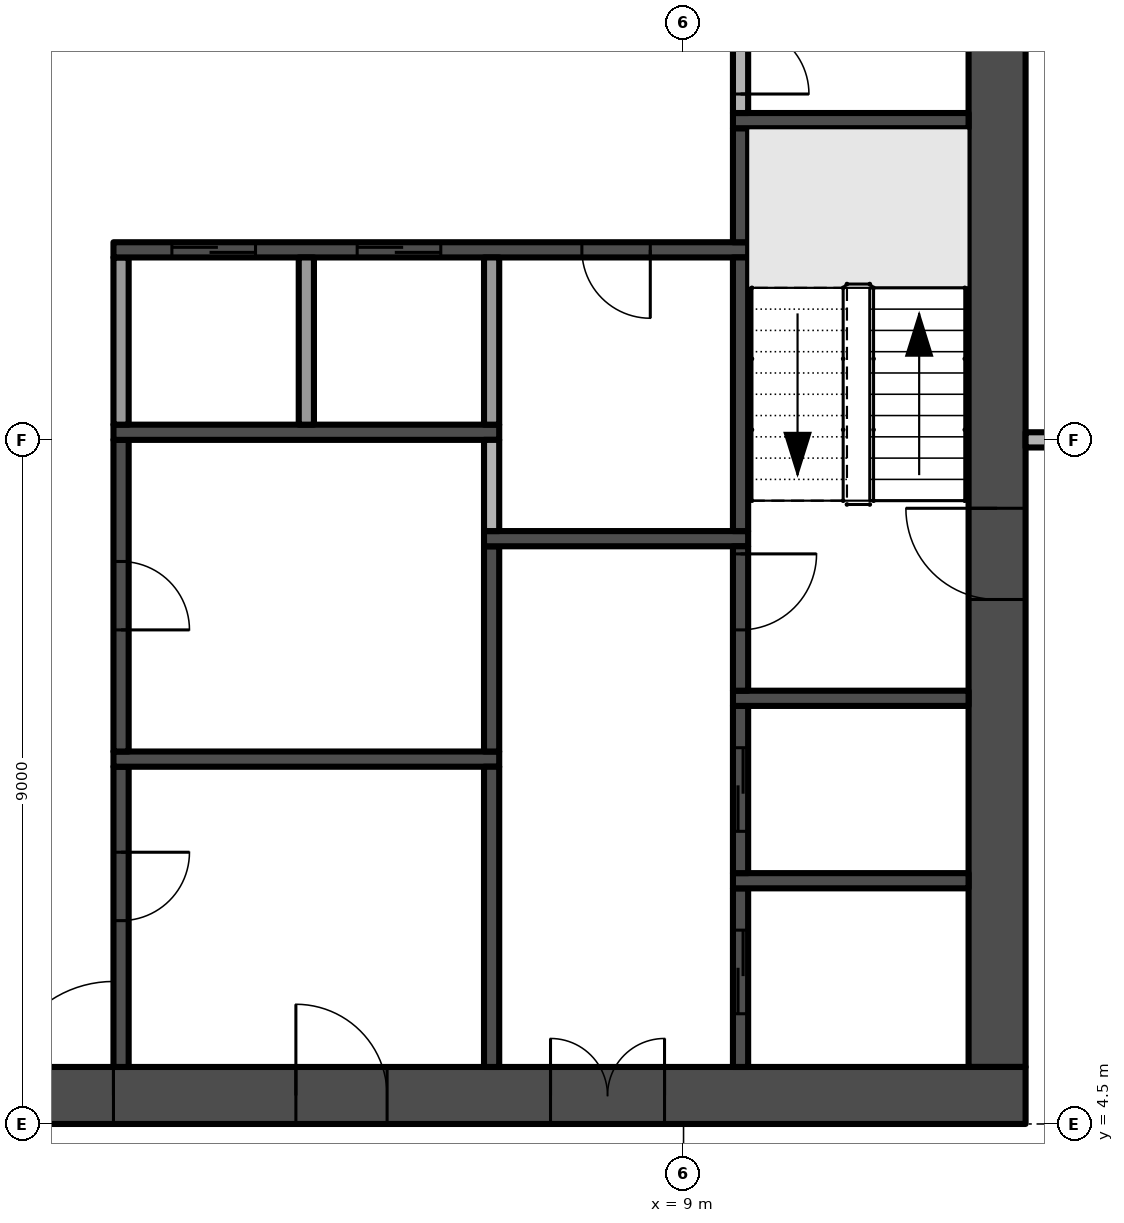
"""IFC4 building model, lengths in metres.
Left out: names, types, materials, properties, quantities, classifications, styles, units other than length and angle.
Written with IfcOpenShell. Run it as: python <this file> out.ifc"""

import sys

from ifc_helpers import new_model, si_unit, direction, frame, frame_2d, origin, place, context, subcontext, project, spatial, rectangle, extrude, element, fill, save


model = new_model("IFC4")
c1 = context("Model", 3, precision=1e-05, world=origin(), true_north=direction((0.0, 1.0)))
c2 = subcontext(c1, "Body", "Model", "MODEL_VIEW")
j1 = project(units=[si_unit("LENGTHUNIT", "METRE"), si_unit("PLANEANGLEUNIT", "RADIAN")], contexts=[c1])
p1 = place(None, origin())
s1 = spatial("IfcSite", under=j1, at=p1, CompositionType="ELEMENT")
p2 = place(p1, origin())
s2 = spatial("IfcBuilding", under=s1, at=p2, CompositionType="ELEMENT")
p3 = place(p2, frame((0.0, 0.0, 128.8)))
s3 = spatial("IfcBuildingStorey", under=s2, at=p3, CompositionType="ELEMENT", Elevation=128.8)
p4 = place(p3, frame((-13.5, 4.875, -0.3), z_axis=(0.0, 0.0, 1.0), x_axis=(1.0, 0.0, 0.0)))
e1 = element("IfcWall", 1, at=p4, inside=s3, PredefinedType="SHEAR", context=c2, shape_type="SweptSolid", body=[
    extrude(rectangle(XDim=27.0, YDim=0.75, at=frame_2d((13.5, 0.0))), origin(), (0.0, 0.0, 1.0), 3.8),
])
p5 = place(p4, frame((12.0, 0.0, 0.3)))
e2 = element("IfcOpeningElement", 2, at=p5, cuts=e1, PredefinedType="OPENING", context=c2, shape_type="SweptSolid", body=[
    extrude(rectangle(XDim=3.0, YDim=2.4, at=frame_2d((1.5, 1.2))), frame((0.0, 0.385, 0.0), z_axis=(0.0, -1.0, 0.0), x_axis=(1.0, 0.0, 0.0)), (0.0, 0.0, 1.0), 0.77),
])
p6 = place(p4, frame((4.9, 0.0, 0.3)))
e3 = element("IfcOpeningElement", 3, at=p6, cuts=e1, PredefinedType="OPENING", context=c2, shape_type="SweptSolid", body=[
    extrude(rectangle(XDim=1.2, YDim=2.2, at=frame_2d((0.6, 1.1))), frame((0.0, 0.385, 0.0), z_axis=(0.0, -1.0, 0.0), x_axis=(1.0, 0.0, 0.0)), (0.0, 0.0, 1.0), 0.77),
])
p7 = place(p4, frame((20.75, 0.0, 0.3)))
e4 = element("IfcOpeningElement", 4, at=p7, cuts=e1, PredefinedType="OPENING", context=c2, shape_type="SweptSolid", body=[
    extrude(rectangle(XDim=1.5, YDim=2.2, at=frame_2d((0.75, 1.1))), frame((0.0, 0.385, 0.0), z_axis=(0.0, -1.0, 0.0), x_axis=(1.0, 0.0, 0.0)), (0.0, 0.0, 1.0), 0.77),
])
p8 = place(p4, frame((17.4, 0.0, 0.3)))
e5 = element("IfcOpeningElement", 5, at=p8, cuts=e1, PredefinedType="OPENING", context=c2, shape_type="SweptSolid", body=[
    extrude(rectangle(XDim=1.2, YDim=2.2, at=frame_2d((0.6, 1.1))), frame((0.0, 0.385, 0.0), z_axis=(0.0, -1.0, 0.0), x_axis=(1.0, 0.0, 0.0)), (0.0, 0.0, 1.0), 0.77),
])
p9 = place(p3, frame((13.125, 5.25, -0.3), z_axis=(0.0, 0.0, 1.0), x_axis=(0.0, 1.0, 0.0)))
e6 = element("IfcWall", 6, at=p9, inside=s3, PredefinedType="SHEAR", context=c2, shape_type="SweptSolid", body=[
    extrude(rectangle(XDim=16.5, YDim=0.75, at=frame_2d((8.25, 0.0))), origin(), (0.0, 0.0, 1.0), 3.8),
])
p10 = place(p9, frame((6.15, 0.0, 0.3)))
e7 = element("IfcOpeningElement", 7, at=p10, cuts=e6, PredefinedType="OPENING", context=c2, shape_type="SweptSolid", body=[
    extrude(rectangle(XDim=1.2, YDim=2.2, at=frame_2d((0.6, 1.1))), frame((0.0, 0.385, 0.0), z_axis=(0.0, -1.0, 0.0), x_axis=(1.0, 0.0, 0.0)), (0.0, 0.0, 1.0), 0.77),
])
p11 = place(p3, frame((1.6, 9.2, 0.0), z_axis=(0.0, 0.0, 1.0), x_axis=(0.0, -1.0, 0.0)))
e8 = element("IfcWall", 8, at=p11, inside=s3, PredefinedType="SHEAR", context=c2, shape_type="SweptSolid", body=[
    extrude(rectangle(XDim=3.95, YDim=0.2, at=frame_2d((1.975, 0.0))), origin(), (0.0, 0.0, 1.0), 3.5),
])
p12 = place(p11, frame((1.125, 0.0, 0.0)))
e9 = element("IfcOpeningElement", 9, at=p12, cuts=e8, PredefinedType="OPENING", context=c2, shape_type="SweptSolid", body=[
    extrude(rectangle(XDim=0.9, YDim=2.1, at=frame_2d((0.45, 1.05))), frame((0.0, 0.11, 0.0), z_axis=(0.0, -1.0, 0.0), x_axis=(1.0, 0.0, 0.0)), (0.0, 0.0, 1.0), 0.22),
])
p13 = place(p3, frame((1.5, 9.3, 0.0), z_axis=(0.0, 0.0, 1.0), x_axis=(1.0, 0.0, 0.0)))
e10 = element("IfcWall", 10, at=p13, inside=s3, PredefinedType="SHEAR", context=c2, shape_type="SweptSolid", body=[
    extrude(rectangle(XDim=5.075, YDim=0.2, at=frame_2d((2.538, 0.0))), origin(), (0.0, 0.0, 1.0), 3.5),
])
p14 = place(p3, frame((1.6, 13.5, 0.0), z_axis=(0.0, 0.0, 1.0), x_axis=(0.0, -1.0, 0.0)))
e11 = element("IfcWall", 11, at=p14, inside=s3, PredefinedType="SHEAR", context=c2, shape_type="SweptSolid", body=[
    extrude(rectangle(XDim=4.1, YDim=0.2, at=frame_2d((2.05, 0.0))), origin(), (0.0, 0.0, 1.0), 3.5),
])
p15 = place(p14, frame((1.6, 0.0, 0.0)))
e12 = element("IfcOpeningElement", 12, at=p15, cuts=e11, PredefinedType="OPENING", context=c2, shape_type="SweptSolid", body=[
    extrude(rectangle(XDim=0.9, YDim=2.1, at=frame_2d((0.45, 1.05))), frame((0.0, 0.11, 0.0), z_axis=(0.0, -1.0, 0.0), x_axis=(1.0, 0.0, 0.0)), (0.0, 0.0, 1.0), 0.22),
])
p16 = place(p3, frame((1.5, 13.6, 0.0), z_axis=(0.0, 0.0, 1.0), x_axis=(1.0, 0.0, 0.0)))
e13 = element("IfcWall", 13, at=p16, inside=s3, PredefinedType="SHEAR", context=c2, shape_type="SweptSolid", body=[
    extrude(rectangle(XDim=5.075, YDim=0.2, at=frame_2d((2.538, 0.0))), origin(), (0.0, 0.0, 1.0), 3.5),
])
p17 = place(p3, frame((1.6, 13.7, 0.0), z_axis=(0.0, 0.0, 1.0), x_axis=(0.0, 1.0, 0.0)))
e14 = element("IfcWall", 14, at=p17, inside=s3, PredefinedType="PARTITIONING", context=c2, shape_type="SweptSolid", body=[
    extrude(rectangle(XDim=2.2, YDim=0.2, at=frame_2d((1.1, 0.0))), origin(), (0.0, 0.0, 1.0), 3.5),
])
p18 = place(p3, frame((9.85, 16.0, 0.0), z_axis=(0.0, 0.0, 1.0), x_axis=(-1.0, 0.0, 0.0)))
e15 = element("IfcWall", 15, at=p18, inside=s3, PredefinedType="SHEAR", context=c2, shape_type="SweptSolid", body=[
    extrude(rectangle(XDim=8.35, YDim=0.2, at=frame_2d((4.175, 0.0))), origin(), (0.0, 0.0, 1.0), 3.5),
])
p19 = place(p18, frame((6.481, 0.0, 0.0)))
e16 = element("IfcOpeningElement", 16, at=p19, cuts=e15, PredefinedType="OPENING", context=c2, shape_type="SweptSolid", body=[
    extrude(rectangle(XDim=1.1, YDim=2.1, at=frame_2d((0.55, 1.05))), frame((0.0, 0.11, 0.0), z_axis=(0.0, -1.0, 0.0), x_axis=(1.0, 0.0, 0.0)), (0.0, 0.0, 1.0), 0.22),
])
p20 = place(p18, frame((4.044, 0.0, 0.0)))
e17 = element("IfcOpeningElement", 17, at=p20, cuts=e15, PredefinedType="OPENING", context=c2, shape_type="SweptSolid", body=[
    extrude(rectangle(XDim=1.1, YDim=2.1, at=frame_2d((0.55, 1.05))), frame((0.0, 0.11, 0.0), z_axis=(0.0, -1.0, 0.0), x_axis=(1.0, 0.0, 0.0)), (0.0, 0.0, 1.0), 0.22),
])
p21 = place(p18, frame((1.288, 0.0, 0.0)))
e18 = element("IfcOpeningElement", 18, at=p21, cuts=e15, PredefinedType="OPENING", context=c2, shape_type="SweptSolid", body=[
    extrude(rectangle(XDim=0.9, YDim=2.1, at=frame_2d((0.45, 1.05))), frame((0.0, 0.11, 0.0), z_axis=(0.0, -1.0, 0.0), x_axis=(1.0, 0.0, 0.0)), (0.0, 0.0, 1.0), 0.22),
])
p22 = place(p3, frame((4.037, 13.7, 0.0), z_axis=(0.0, 0.0, 1.0), x_axis=(0.0, 1.0, 0.0)))
e19 = element("IfcWall", 19, at=p22, inside=s3, PredefinedType="PARTITIONING", context=c2, shape_type="SweptSolid", body=[
    extrude(rectangle(XDim=2.2, YDim=0.2, at=frame_2d((1.1, 0.0))), origin(), (0.0, 0.0, 1.0), 3.5),
])
p23 = place(p3, frame((6.475, 5.25, 0.0), z_axis=(0.0, 0.0, 1.0), x_axis=(0.0, 1.0, 0.0)))
e20 = element("IfcWall", 20, at=p23, inside=s3, PredefinedType="SHEAR", context=c2, shape_type="SweptSolid", body=[
    extrude(rectangle(XDim=3.95, YDim=0.2, at=frame_2d((1.975, 0.0))), origin(), (0.0, 0.0, 1.0), 3.5),
])
p24 = place(p3, frame((6.475, 9.4, 0.0), z_axis=(0.0, 0.0, 1.0), x_axis=(0.0, 1.0, 0.0)))
e21 = element("IfcWall", 21, at=p24, inside=s3, PredefinedType="SHEAR", context=c2, shape_type="SweptSolid", body=[
    extrude(rectangle(XDim=2.7, YDim=0.2, at=frame_2d((1.35, 0.0))), origin(), (0.0, 0.0, 1.0), 3.5),
])
p25 = place(p3, frame((6.375, 12.2, 0.0), z_axis=(0.0, 0.0, 1.0), x_axis=(1.0, 0.0, 0.0)))
e22 = element("IfcWall", 22, at=p25, inside=s3, PredefinedType="SHEAR", context=c2, shape_type="SweptSolid", body=[
    extrude(rectangle(XDim=3.475, YDim=0.2, at=frame_2d((1.738, 0.0))), origin(), (0.0, 0.0, 1.0), 3.5),
])
p26 = place(p3, frame((6.475, 12.3, 0.0), z_axis=(0.0, 0.0, 1.0), x_axis=(0.0, 1.0, 0.0)))
e23 = element("IfcWall", 23, at=p26, inside=s3, PredefinedType="PARTITIONING", context=c2, shape_type="SweptSolid", body=[
    extrude(rectangle(XDim=1.2, YDim=0.2, at=frame_2d((0.6, 0.0))), origin(), (0.0, 0.0, 1.0), 3.5),
])
p27 = place(p3, frame((6.475, 13.7, 0.0), z_axis=(0.0, 0.0, 1.0), x_axis=(0.0, 1.0, 0.0)))
e24 = element("IfcWall", 24, at=p27, inside=s3, PredefinedType="PARTITIONING", context=c2, shape_type="SweptSolid", body=[
    extrude(rectangle(XDim=2.2, YDim=0.2, at=frame_2d((1.1, 0.0))), origin(), (0.0, 0.0, 1.0), 3.5),
])
p28 = place(p3, frame((9.75, 5.25, 0.0), z_axis=(0.0, 0.0, 1.0), x_axis=(0.0, 1.0, 0.0)))
e25 = element("IfcWall", 25, at=p28, inside=s3, PredefinedType="SHEAR", context=c2, shape_type="SweptSolid", body=[
    extrude(rectangle(XDim=2.35, YDim=0.2, at=frame_2d((1.175, 0.0))), origin(), (0.0, 0.0, 1.0), 3.5),
])
p29 = place(p28, frame((0.7, 0.0, 0.0)))
e26 = element("IfcOpeningElement", 26, at=p29, cuts=e25, PredefinedType="OPENING", context=c2, shape_type="SweptSolid", body=[
    extrude(rectangle(XDim=1.1, YDim=2.1, at=frame_2d((0.55, 1.05))), frame((0.0, 0.11, 0.0), z_axis=(0.0, -1.0, 0.0), x_axis=(1.0, 0.0, 0.0)), (0.0, 0.0, 1.0), 0.22),
])
p30 = place(p3, frame((9.65, 7.7, 0.0), z_axis=(0.0, 0.0, 1.0), x_axis=(1.0, 0.0, 0.0)))
e27 = element("IfcWall", 27, at=p30, inside=s3, PredefinedType="SHEAR", context=c2, shape_type="SweptSolid", body=[
    extrude(rectangle(XDim=3.1, YDim=0.2, at=frame_2d((1.55, 0.0))), origin(), (0.0, 0.0, 1.0), 3.5),
])
p31 = place(p3, frame((9.75, 7.8, 0.0), z_axis=(0.0, 0.0, 1.0), x_axis=(0.0, 1.0, 0.0)))
e28 = element("IfcWall", 28, at=p31, inside=s3, PredefinedType="SHEAR", context=c2, shape_type="SweptSolid", body=[
    extrude(rectangle(XDim=2.2, YDim=0.2, at=frame_2d((1.1, 0.0))), origin(), (0.0, 0.0, 1.0), 3.5),
])
p32 = place(p31, frame((0.55, 0.0, 0.0)))
e29 = element("IfcOpeningElement", 29, at=p32, cuts=e28, PredefinedType="OPENING", context=c2, shape_type="SweptSolid", body=[
    extrude(rectangle(XDim=1.1, YDim=2.1, at=frame_2d((0.55, 1.05))), frame((0.0, 0.11, 0.0), z_axis=(0.0, -1.0, 0.0), x_axis=(1.0, 0.0, 0.0)), (0.0, 0.0, 1.0), 0.22),
])
p33 = place(p3, frame((9.65, 10.1, 0.0), z_axis=(0.0, 0.0, 1.0), x_axis=(1.0, 0.0, 0.0)))
e30 = element("IfcWall", 30, at=p33, inside=s3, PredefinedType="SHEAR", context=c2, shape_type="SweptSolid", body=[
    extrude(rectangle(XDim=3.1, YDim=0.2, at=frame_2d((1.55, 0.0))), origin(), (0.0, 0.0, 1.0), 3.5),
])
p34 = place(p3, frame((9.75, 12.1, 0.0), z_axis=(0.0, 0.0, 1.0), x_axis=(0.0, -1.0, 0.0)))
e31 = element("IfcWall", 31, at=p34, inside=s3, PredefinedType="SHEAR", context=c2, shape_type="SweptSolid", body=[
    extrude(rectangle(XDim=1.9, YDim=0.2, at=frame_2d((0.95, 0.0))), origin(), (0.0, 0.0, 1.0), 3.5),
])
p35 = place(p34, frame((0.1, 0.0, 0.0)))
e32 = element("IfcOpeningElement", 32, at=p35, cuts=e31, PredefinedType="OPENING", context=c2, shape_type="SweptSolid", body=[
    extrude(rectangle(XDim=1.0, YDim=2.2, at=frame_2d((0.5, 1.1))), frame((0.0, 0.11, 0.0), z_axis=(0.0, -1.0, 0.0), x_axis=(1.0, 0.0, 0.0)), (0.0, 0.0, 1.0), 0.22),
])
p36 = place(p3, frame((9.75, 12.3, 0.0), z_axis=(0.0, 0.0, 1.0), x_axis=(0.0, 1.0, 0.0)))
e33 = element("IfcWall", 33, at=p36, inside=s3, PredefinedType="SHEAR", context=c2, shape_type="SweptSolid", body=[
    extrude(rectangle(XDim=3.6, YDim=0.2, at=frame_2d((1.8, 0.0))), origin(), (0.0, 0.0, 1.0), 3.5),
])
p37 = place(p3, frame((9.75, 16.1, 0.0), z_axis=(0.0, 0.0, 1.0), x_axis=(0.0, 1.0, 0.0)))
e34 = element("IfcWall", 34, at=p37, inside=s3, PredefinedType="SHEAR", context=c2, shape_type="SweptSolid", body=[
    extrude(rectangle(XDim=1.5, YDim=0.2, at=frame_2d((0.75, 0.0))), origin(), (0.0, 0.0, 1.0), 3.5),
])
p38 = place(p3, frame((9.65, 17.7, 0.0), z_axis=(0.0, 0.0, 1.0), x_axis=(1.0, 0.0, 0.0)))
e35 = element("IfcWall", 35, at=p38, inside=s3, PredefinedType="SHEAR", context=c2, shape_type="SweptSolid", body=[
    extrude(rectangle(XDim=3.1, YDim=0.2, at=frame_2d((1.55, 0.0))), origin(), (0.0, 0.0, 1.0), 3.5),
])
p39 = place(p3, frame((9.75, 19.2, 0.0), z_axis=(0.0, 0.0, 1.0), x_axis=(0.0, -1.0, 0.0)))
e36 = element("IfcWall", 36, at=p39, inside=s3, PredefinedType="PARTITIONING", context=c2, shape_type="SweptSolid", body=[
    extrude(rectangle(XDim=1.4, YDim=0.2, at=frame_2d((0.7, 0.0))), origin(), (0.0, 0.0, 1.0), 3.5),
])
p40 = place(p39, frame((0.25, 0.0, 0.0)))
e37 = element("IfcOpeningElement", 37, at=p40, cuts=e36, PredefinedType="OPENING", context=c2, shape_type="SweptSolid", body=[
    extrude(rectangle(XDim=0.9, YDim=2.1, at=frame_2d((0.45, 1.05))), frame((0.0, 0.11, 0.0), z_axis=(0.0, -1.0, 0.0), x_axis=(1.0, 0.0, 0.0)), (0.0, 0.0, 1.0), 0.22),
])
p41 = place(p3, frame((13.5, 13.5, 0.0), z_axis=(0.0, 0.0, 1.0), x_axis=(1.0, 0.0, 0.0)))
e38 = element("IfcWall", 38, at=p41, inside=s3, PredefinedType="PARTITIONING", context=c2, shape_type="SweptSolid", body=[
    extrude(rectangle(XDim=3.85, YDim=0.2, at=frame_2d((1.925, 0.0))), origin(), (0.0, 0.0, 1.0), 3.5),
])
p42 = place(p41, frame((1.6, 0.0, 0.0)))
e39 = element("IfcOpeningElement", 39, at=p42, cuts=e38, PredefinedType="OPENING", context=c2, shape_type="SweptSolid", body=[
    extrude(rectangle(XDim=0.9, YDim=2.1, at=frame_2d((0.45, 1.05))), frame((0.0, 0.11, 0.0), z_axis=(0.0, -1.0, 0.0), x_axis=(1.0, 0.0, 0.0)), (0.0, 0.0, 1.0), 0.22),
])
p43 = place(p5, frame((3.0, 0.0, 0.0), z_axis=(0.0, 0.0, 1.0), x_axis=(-1.0, 0.0, 0.0)))
e40 = element("IfcDoor", 40, at=p43, inside=s3, OperationType="DOUBLE_DOOR_SINGLE_SWING", PredefinedType="DOOR", context=c2, shape_type="SweptSolid", body=[
    extrude(rectangle(XDim=3.0, YDim=2.4, at=frame_2d((1.5, 1.2))), frame((0.0, 0.025, 0.0), z_axis=(0.0, -1.0, 0.0), x_axis=(1.0, 0.0, 0.0)), (0.0, 0.0, 1.0), 0.05),
])
fill(e2, e40)
p44 = place(p10, frame((1.2, 0.0, 0.0), z_axis=(0.0, 0.0, 1.0), x_axis=(-1.0, 0.0, 0.0)))
e41 = element("IfcDoor", 41, at=p44, inside=s3, OperationType="SINGLE_SWING_LEFT", PredefinedType="DOOR", context=c2, shape_type="SweptSolid", body=[
    extrude(rectangle(XDim=1.2, YDim=2.2, at=frame_2d((0.6, 1.1))), frame((0.0, 0.025, 0.0), z_axis=(0.0, -1.0, 0.0), x_axis=(1.0, 0.0, 0.0)), (0.0, 0.0, 1.0), 0.05),
])
fill(e7, e41)
p45 = place(p7, frame((1.5, 0.0, 0.0), z_axis=(0.0, 0.0, 1.0), x_axis=(-1.0, 0.0, 0.0)))
e42 = element("IfcDoor", 42, at=p45, inside=s3, OperationType="DOUBLE_DOOR_SINGLE_SWING", PredefinedType="DOOR", context=c2, shape_type="SweptSolid", body=[
    extrude(rectangle(XDim=1.5, YDim=2.2, at=frame_2d((0.75, 1.1))), frame((0.0, 0.025, 0.0), z_axis=(0.0, -1.0, 0.0), x_axis=(1.0, 0.0, 0.0)), (0.0, 0.0, 1.0), 0.05),
])
fill(e4, e42)
p46 = place(p8, frame((1.2, 0.0, 0.0), z_axis=(0.0, 0.0, 1.0), x_axis=(-1.0, 0.0, 0.0)))
e43 = element("IfcDoor", 43, at=p46, inside=s3, OperationType="SINGLE_SWING_RIGHT", PredefinedType="DOOR", context=c2, shape_type="SweptSolid", body=[
    extrude(rectangle(XDim=1.2, YDim=2.2, at=frame_2d((0.6, 1.1))), frame((0.0, 0.025, 0.0), z_axis=(0.0, -1.0, 0.0), x_axis=(1.0, 0.0, 0.0)), (0.0, 0.0, 1.0), 0.05),
])
fill(e5, e43)
p47 = place(p35, origin())
e44 = element("IfcDoor", 44, at=p47, inside=s3, OperationType="SINGLE_SWING_LEFT", PredefinedType="DOOR", context=c2, shape_type="SweptSolid", body=[
    extrude(rectangle(XDim=1.0, YDim=2.2, at=frame_2d((0.5, 1.1))), frame((0.0, 0.025, 0.0), z_axis=(0.0, -1.0, 0.0), x_axis=(1.0, 0.0, 0.0)), (0.0, 0.0, 1.0), 0.05),
])
fill(e32, e44)
p48 = place(p19, origin())
e45 = element("IfcDoor", 45, at=p48, inside=s3, OperationType="SLIDING_TO_RIGHT", PredefinedType="DOOR", context=c2, shape_type="SweptSolid", body=[
    extrude(rectangle(XDim=1.1, YDim=2.1, at=frame_2d((0.55, 1.05))), frame((0.0, 0.025, 0.0), z_axis=(0.0, -1.0, 0.0), x_axis=(1.0, 0.0, 0.0)), (0.0, 0.0, 1.0), 0.05),
])
fill(e16, e45)
p49 = place(p20, origin())
e46 = element("IfcDoor", 46, at=p49, inside=s3, OperationType="SLIDING_TO_RIGHT", PredefinedType="DOOR", context=c2, shape_type="SweptSolid", body=[
    extrude(rectangle(XDim=1.1, YDim=2.1, at=frame_2d((0.55, 1.05))), frame((0.0, 0.025, 0.0), z_axis=(0.0, -1.0, 0.0), x_axis=(1.0, 0.0, 0.0)), (0.0, 0.0, 1.0), 0.05),
])
fill(e17, e46)
p50 = place(p29, origin())
e47 = element("IfcDoor", 47, at=p50, inside=s3, OperationType="SLIDING_TO_RIGHT", PredefinedType="DOOR", context=c2, shape_type="SweptSolid", body=[
    extrude(rectangle(XDim=1.1, YDim=2.1, at=frame_2d((0.55, 1.05))), frame((0.0, 0.025, 0.0), z_axis=(0.0, -1.0, 0.0), x_axis=(1.0, 0.0, 0.0)), (0.0, 0.0, 1.0), 0.05),
])
fill(e26, e47)
p51 = place(p32, origin())
e48 = element("IfcDoor", 48, at=p51, inside=s3, OperationType="SLIDING_TO_RIGHT", PredefinedType="DOOR", context=c2, shape_type="SweptSolid", body=[
    extrude(rectangle(XDim=1.1, YDim=2.1, at=frame_2d((0.55, 1.05))), frame((0.0, 0.025, 0.0), z_axis=(0.0, -1.0, 0.0), x_axis=(1.0, 0.0, 0.0)), (0.0, 0.0, 1.0), 0.05),
])
fill(e29, e48)
p52 = place(p12, origin())
e49 = element("IfcDoor", 49, at=p52, inside=s3, OperationType="SINGLE_SWING_LEFT", PredefinedType="DOOR", context=c2, shape_type="SweptSolid", body=[
    extrude(rectangle(XDim=0.9, YDim=2.1, at=frame_2d((0.45, 1.05))), frame((0.0, 0.025, 0.0), z_axis=(0.0, -1.0, 0.0), x_axis=(1.0, 0.0, 0.0)), (0.0, 0.0, 1.0), 0.05),
])
fill(e9, e49)
p53 = place(p15, origin())
e50 = element("IfcDoor", 50, at=p53, inside=s3, OperationType="SINGLE_SWING_RIGHT", PredefinedType="DOOR", context=c2, shape_type="SweptSolid", body=[
    extrude(rectangle(XDim=0.9, YDim=2.1, at=frame_2d((0.45, 1.05))), frame((0.0, 0.025, 0.0), z_axis=(0.0, -1.0, 0.0), x_axis=(1.0, 0.0, 0.0)), (0.0, 0.0, 1.0), 0.05),
])
fill(e12, e50)
p54 = place(p21, origin())
e51 = element("IfcDoor", 51, at=p54, inside=s3, OperationType="SINGLE_SWING_LEFT", PredefinedType="DOOR", context=c2, shape_type="SweptSolid", body=[
    extrude(rectangle(XDim=0.9, YDim=2.1, at=frame_2d((0.45, 1.05))), frame((0.0, 0.025, 0.0), z_axis=(0.0, -1.0, 0.0), x_axis=(1.0, 0.0, 0.0)), (0.0, 0.0, 1.0), 0.05),
])
fill(e18, e51)
p55 = place(p40, origin())
e52 = element("IfcDoor", 52, at=p55, inside=s3, OperationType="SINGLE_SWING_RIGHT", PredefinedType="DOOR", context=c2, shape_type="SweptSolid", body=[
    extrude(rectangle(XDim=0.9, YDim=2.1, at=frame_2d((0.45, 1.05))), frame((0.0, 0.025, 0.0), z_axis=(0.0, -1.0, 0.0), x_axis=(1.0, 0.0, 0.0)), (0.0, 0.0, 1.0), 0.05),
])
fill(e37, e52)
save(model, sys.argv[1])
